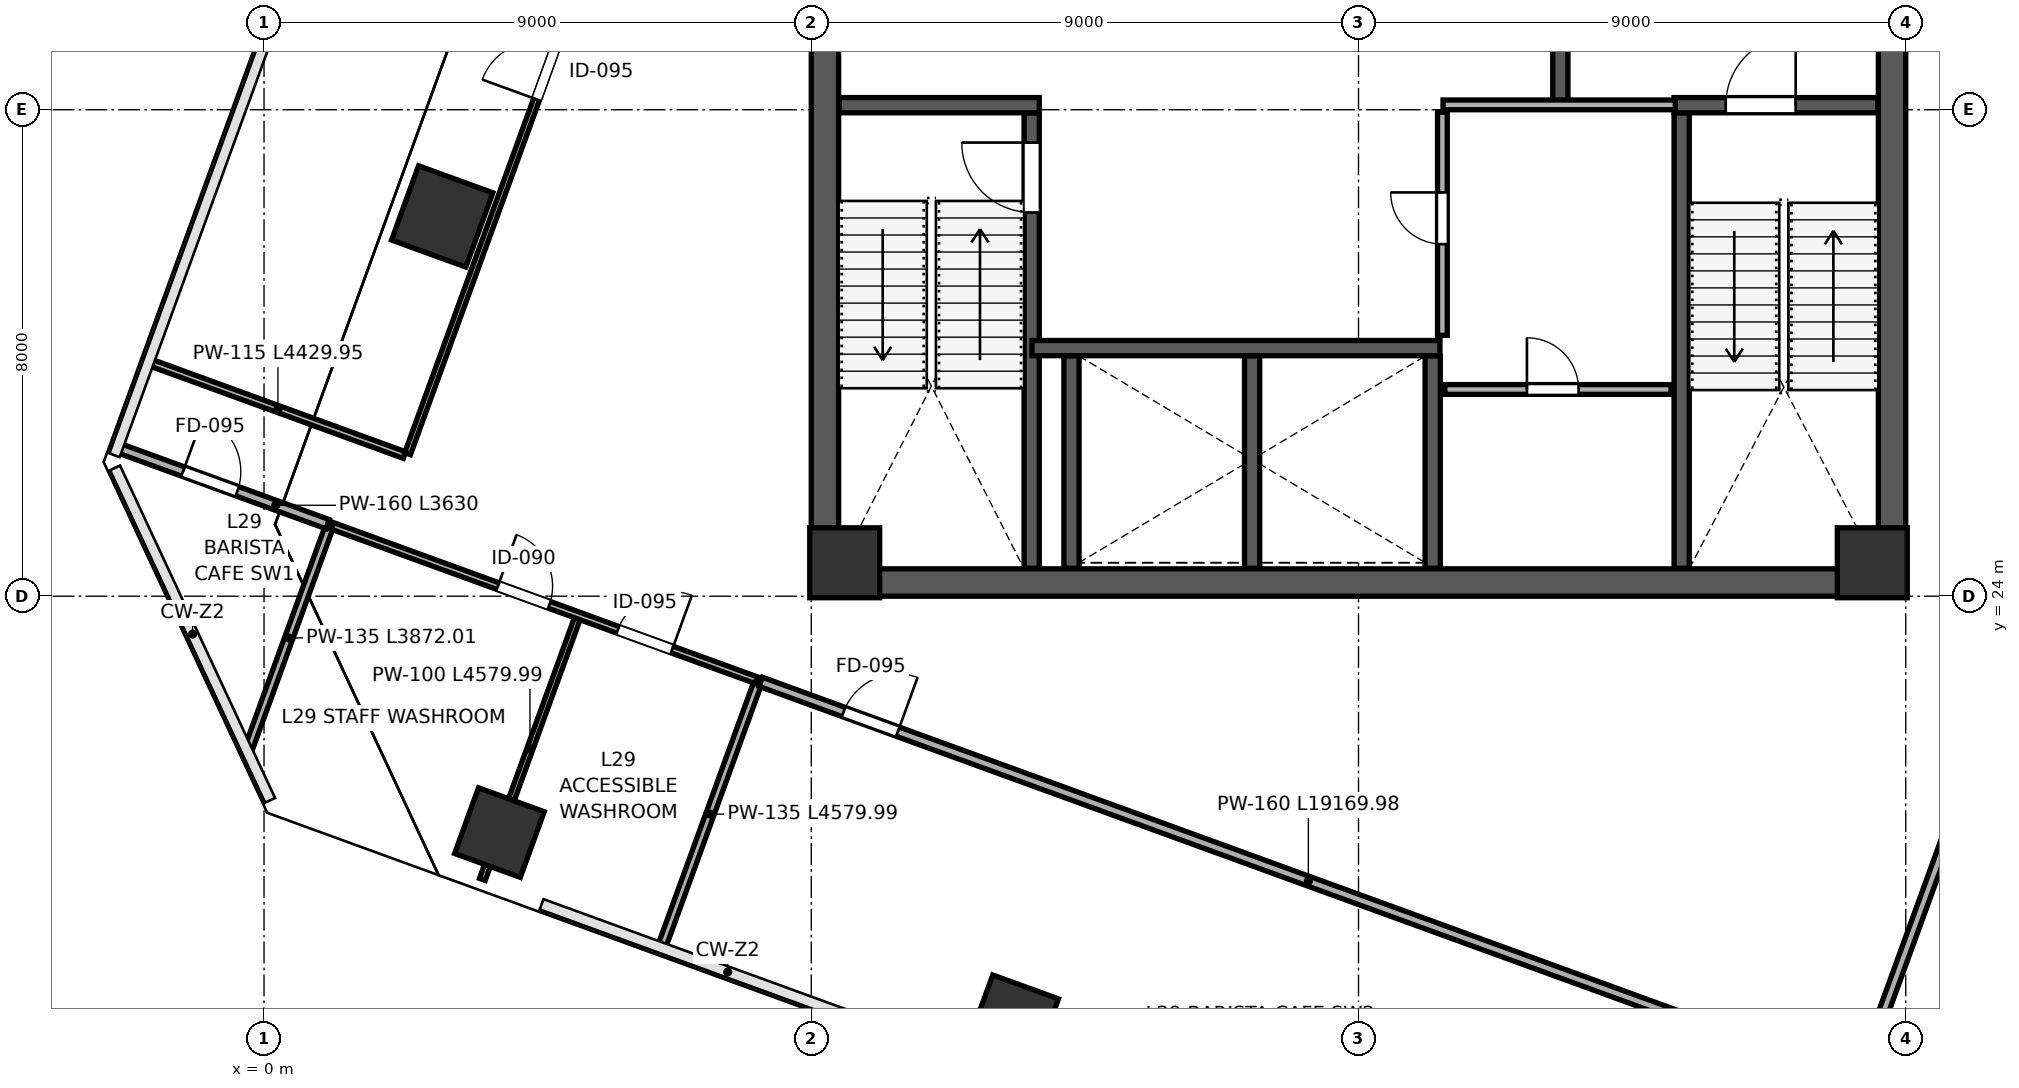
"""IFC4 building model, lengths in metres.
Left out: names, types, materials, properties, quantities, classifications, styles, units other than length and angle.
Written with IfcOpenShell. Run it as: python <this file> out.ifc"""

import sys

from ifc_helpers import new_model, si_unit, direction, frame, frame_2d, origin, origin_2d, place, context, subcontext, project, spatial, rectangle, extrude, clip, halfspace, source, transform, mapped, element, fill, save


model = new_model("IFC4")
c1 = context("Model", 3, precision=1e-05, world=origin(), true_north=direction((0.0, 1.0)))
c2 = subcontext(c1, "Body", "Model", "MODEL_VIEW")
j1 = project(units=[si_unit("LENGTHUNIT", "METRE"), si_unit("PLANEANGLEUNIT", "RADIAN")], contexts=[c1])
p1 = place(None, origin())
s1 = spatial("IfcSite", under=j1, at=p1, CompositionType="ELEMENT")
p2 = place(p1, origin())
s2 = spatial("IfcBuilding", under=s1, at=p2, CompositionType="ELEMENT")
p3 = place(p2, frame((0.0, 0.0, 133.0)))
s3 = spatial("IfcBuildingStorey", under=s2, at=p3, CompositionType="ELEMENT", Elevation=133.0)
m1 = source(origin(), c2, "Body", "SweptSolid", [
    extrude(rectangle(XDim=1.15, YDim=1.15, at=origin_2d()), origin(), (0.0, 0.0, 1.0), 4.198),
])
for number, where, z_axis, x_axis in (
    (1, (9.55, 24.55, 0.001), (0.0, 0.0, 1.0), (1.0, 0.0, 0.0)),
    (2, (26.45, 24.55, 0.001), (0.0, 0.0, 1.0), (1.0, 0.0, 0.0)),
):
    element("IfcColumn", number, at=place(p3, frame(where, z_axis=z_axis, x_axis=x_axis)), inside=s3, PredefinedType="COLUMN", context=c2, shape_type="MappedRepresentation", body=[
        mapped(m1, transform((0.0, 0.0, 0.0), scale=1.0)),
    ])
p4 = place(p3, frame((3.871, 20.113, 0.0), z_axis=(-0.060378020658, 0.091693702185, 0.99395510945), x_axis=(0.971784646973, 0.232861844496, 0.037549451193)))
e3 = element("IfcColumn", 3, at=p4, inside=s3, PredefinedType="COLUMN", context=c2, shape_type="Clipping", body=[
    clip(clip(extrude(rectangle(XDim=1.15, YDim=1.15, at=origin_2d()), origin(), (0.0, 0.0, 1.0), 4.226), halfspace(frame((0.0, 0.0, 0.082), z_axis=(0.0, 0.0, -1.0), x_axis=(1.0, 0.0, 0.0)), False)), halfspace(frame((0.0, 0.0, 4.144), z_axis=(0.0, 0.0, 1.0), x_axis=(1.0, 0.0, 0.0)), False)),
])
p5 = place(p3, frame((12.328, 17.034, 0.0), z_axis=(-0.076934640487, 0.048279526084, 0.995866531446), x_axis=(0.787992689397, 0.614900375793, 0.031065242737)))
e4 = element("IfcColumn", 4, at=p5, inside=s3, PredefinedType="COLUMN", context=c2, shape_type="Clipping", body=[
    clip(clip(extrude(rectangle(XDim=1.15, YDim=1.15, at=origin_2d()), origin(), (0.0, 0.0, 1.0), 4.217), halfspace(frame((0.0, 0.0, 0.068), z_axis=(0.0, 0.0, -1.0), x_axis=(1.0, 0.0, 0.0)), False)), halfspace(frame((0.0, 0.0, 4.149), z_axis=(0.0, 0.0, 1.0), x_axis=(1.0, 0.0, 0.0)), False)),
])
p6 = place(p3, frame((2.93, 30.246, 0.0), z_axis=(-0.007984514186, 0.096045605421, 0.995344909673), x_axis=(0.964665591545, -0.261407243839, 0.032962848131)))
e5 = element("IfcColumn", 5, at=p6, inside=s3, PredefinedType="COLUMN", context=c2, shape_type="Clipping", body=[
    clip(clip(extrude(rectangle(XDim=1.3, YDim=1.3, at=origin_2d()), origin(), (0.0, 0.0, 1.0), 4.219), halfspace(frame((0.0, 0.0, 0.082), z_axis=(0.0, 0.0, -1.0), x_axis=(1.0, 0.0, 0.0)), False)), halfspace(frame((0.0, 0.0, 4.138), z_axis=(0.0, 0.0, 1.0), x_axis=(1.0, 0.0, 0.0)), False)),
])
p7 = place(p3, frame((9.225, 24.45, 0.0), z_axis=(0.0, 0.0, 1.0), x_axis=(0.0, 1.0, 0.0)))
e6 = element("IfcWall", 6, at=p7, inside=s3, PredefinedType="SHEAR", context=c2, shape_type="SweptSolid", body=[
    extrude(rectangle(XDim=15.1, YDim=0.45, at=frame_2d((7.55, 0.0))), origin(), (0.0, 0.0, 1.0), 3.96),
])
p8 = place(p3, frame((26.775, 24.45, 0.0), z_axis=(0.0, 0.0, 1.0), x_axis=(0.0, 1.0, 0.0)))
e7 = element("IfcWall", 7, at=p8, inside=s3, PredefinedType="SHEAR", context=c2, shape_type="SweptSolid", body=[
    extrude(rectangle(XDim=15.1, YDim=0.45, at=frame_2d((7.55, 0.0))), origin(), (0.0, 0.0, 1.0), 3.96),
])
p9 = place(p8, frame((8.6, 0.0, 0.0)))
e8 = element("IfcOpeningElement", 8, at=p9, cuts=e7, PredefinedType="OPENING", context=c2, shape_type="SweptSolid", body=[
    extrude(rectangle(XDim=1.15, YDim=2.2, at=frame_2d((0.575, 1.1))), frame((0.0, 0.235, 0.0), z_axis=(0.0, -1.0, 0.0), x_axis=(1.0, 0.0, 0.0)), (0.0, 0.0, 1.0), 0.47),
])
p10 = place(p3, frame((9.0, 24.225, 0.0), z_axis=(0.0, 0.0, 1.0), x_axis=(1.0, 0.0, 0.0)))
e9 = element("IfcWall", 9, at=p10, inside=s3, PredefinedType="SHEAR", context=c2, shape_type="SweptSolid", body=[
    extrude(rectangle(XDim=18.0, YDim=0.45, at=frame_2d((9.0, 0.0))), origin(), (0.0, 0.0, 1.0), 3.96),
])
p11 = place(p3, frame((12.625, 24.46, 0.0), z_axis=(0.0, 0.0, 1.0), x_axis=(0.0, 1.0, 0.0)))
e10 = element("IfcWall", 10, at=p11, inside=s3, PredefinedType="SHEAR", context=c2, shape_type="SweptSolid", body=[
    extrude(rectangle(XDim=7.49, YDim=0.25, at=frame_2d((3.745, 0.0))), origin(), (0.0, 0.0, 1.0), 3.96),
])
p12 = place(p11, frame((5.85, 0.0, 0.0)))
e11 = element("IfcOpeningElement", 11, at=p12, cuts=e10, PredefinedType="OPENING", context=c2, shape_type="SweptSolid", body=[
    extrude(rectangle(XDim=1.15, YDim=2.2, at=frame_2d((0.575, 1.1))), frame((0.0, 0.135, 0.0), z_axis=(0.0, -1.0, 0.0), x_axis=(1.0, 0.0, 0.0)), (0.0, 0.0, 1.0), 0.27),
])
p13 = place(p3, frame((9.46, 32.075, 0.0), z_axis=(0.0, 0.0, 1.0), x_axis=(1.0, 0.0, 0.0)))
e12 = element("IfcWall", 12, at=p13, inside=s3, PredefinedType="SHEAR", context=c2, shape_type="SweptSolid", body=[
    extrude(rectangle(XDim=3.29, YDim=0.25, at=frame_2d((1.645, 0.0))), origin(), (0.0, 0.0, 1.0), 3.96),
])
p14 = place(p3, frame((23.315, 24.46, 0.0), z_axis=(0.0, 0.0, 1.0), x_axis=(0.0, 1.0, 0.0)))
e13 = element("IfcWall", 13, at=p14, inside=s3, PredefinedType="SHEAR", context=c2, shape_type="SweptSolid", body=[
    extrude(rectangle(XDim=7.49, YDim=0.25, at=frame_2d((3.745, 0.0))), origin(), (0.0, 0.0, 1.0), 3.96),
])
p15 = place(p3, frame((23.19, 32.075, 0.0), z_axis=(0.0, 0.0, 1.0), x_axis=(1.0, 0.0, 0.0)))
e14 = element("IfcWall", 14, at=p15, inside=s3, PredefinedType="SHEAR", context=c2, shape_type="SweptSolid", body=[
    extrude(rectangle(XDim=3.35, YDim=0.25, at=frame_2d((1.675, 0.0))), origin(), (0.0, 0.0, 1.0), 3.96),
])
p16 = place(p15, frame((0.85, 0.0, 0.0)))
e15 = element("IfcOpeningElement", 15, at=p16, cuts=e14, PredefinedType="OPENING", context=c2, shape_type="SweptSolid", body=[
    extrude(rectangle(XDim=1.15, YDim=2.2, at=frame_2d((0.575, 1.1))), frame((0.0, 0.135, 0.0), z_axis=(0.0, -1.0, 0.0), x_axis=(1.0, 0.0, 0.0)), (0.0, 0.0, 1.0), 0.27),
])
p17 = place(p3, frame((21.32, 32.12, 0.0), z_axis=(0.0, 0.0, 1.0), x_axis=(0.0, 1.0, 0.0)))
e16 = element("IfcWall", 16, at=p17, inside=s3, PredefinedType="SHEAR", context=c2, shape_type="SweptSolid", body=[
    extrude(rectangle(XDim=7.42, YDim=0.25, at=frame_2d((3.71, 0.0))), origin(), (0.0, 0.0, 1.0), 3.96),
])
p18 = place(p17, frame((1.4, 0.0, 0.0)))
e17 = element("IfcOpeningElement", 17, at=p18, cuts=e16, PredefinedType="OPENING", context=c2, shape_type="SweptSolid", body=[
    extrude(rectangle(XDim=1.15, YDim=2.2, at=frame_2d((0.575, 1.1))), frame((0.0, 0.135, 0.0), z_axis=(0.0, -1.0, 0.0), x_axis=(1.0, 0.0, 0.0)), (0.0, 0.0, 1.0), 0.27),
])
p19 = place(p3, frame((12.63, 28.08, 0.0), z_axis=(0.0, 0.0, 1.0), x_axis=(1.0, 0.0, 0.0)))
e18 = element("IfcWall", 18, at=p19, inside=s3, PredefinedType="SHEAR", context=c2, shape_type="SweptSolid", body=[
    extrude(rectangle(XDim=6.71, YDim=0.25, at=frame_2d((3.355, 0.0))), origin(), (0.0, 0.0, 1.0), 3.96),
])
for number, where, z_axis, x_axis in (
    (19, (13.28, 24.46, 0.0), (0.0, 0.0, 1.0), (0.0, 1.0, 0.0)),
    (20, (16.25, 24.46, 0.0), (0.0, 0.0, 1.0), (0.0, 1.0, 0.0)),
    (21, (19.22, 24.46, 0.0), (0.0, 0.0, 1.0), (0.0, 1.0, 0.0)),
):
    element("IfcWall", number, at=place(p3, frame(where, z_axis=z_axis, x_axis=x_axis)), inside=s3, PredefinedType="SHEAR", context=c2, shape_type="SweptSolid", body=[
        extrude(rectangle(XDim=3.49, YDim=0.25, at=frame_2d((1.745, 0.0))), origin(), (0.0, 0.0, 1.0), 3.96),
    ])
p20 = place(p3, frame((19.39, 32.08, 0.0), z_axis=(0.0, 0.0, 1.0), x_axis=(1.0, 0.0, 0.0)))
e22 = element("IfcWall", 22, at=p20, inside=s3, PredefinedType="PARTITIONING", context=c2, shape_type="SweptSolid", body=[
    extrude(rectangle(XDim=3.82, YDim=0.16, at=frame_2d((1.91, 0.0))), origin(), (0.0, 0.0, 1.0), 3.96),
])
p21 = place(p3, frame((19.38, 28.29, 0.0), z_axis=(0.0, 0.0, 1.0), x_axis=(0.0, 1.0, 0.0)))
e23 = element("IfcWall", 23, at=p21, inside=s3, PredefinedType="PARTITIONING", context=c2, shape_type="SweptSolid", body=[
    extrude(rectangle(XDim=3.67, YDim=0.16, at=frame_2d((1.835, 0.0))), origin(), (0.0, 0.0, 1.0), 3.96),
])
p22 = place(p21, frame((1.5, 0.0, 0.0)))
e24 = element("IfcOpeningElement", 24, at=p22, cuts=e23, PredefinedType="OPENING", context=c2, shape_type="SweptSolid", body=[
    extrude(rectangle(XDim=0.85, YDim=2.1, at=frame_2d((0.425, 1.05))), frame((0.0, 0.09, 0.0), z_axis=(0.0, -1.0, 0.0), x_axis=(1.0, 0.0, 0.0)), (0.0, 0.0, 1.0), 0.18),
])
p23 = place(p3, frame((19.42, 27.4, 0.0), z_axis=(0.0, 0.0, 1.0), x_axis=(1.0, 0.0, 0.0)))
e25 = element("IfcWall", 25, at=p23, inside=s3, PredefinedType="PARTITIONING", context=c2, shape_type="SweptSolid", body=[
    extrude(rectangle(XDim=3.72, YDim=0.16, at=frame_2d((1.86, 0.0))), origin(), (0.0, 0.0, 1.0), 3.96),
])
p24 = place(p23, frame((1.35, 0.0, 0.0)))
e26 = element("IfcOpeningElement", 26, at=p24, cuts=e25, PredefinedType="OPENING", context=c2, shape_type="SweptSolid", body=[
    extrude(rectangle(XDim=0.85, YDim=2.1, at=frame_2d((0.425, 1.05))), frame((0.0, 0.09, 0.0), z_axis=(0.0, -1.0, 0.0), x_axis=(1.0, 0.0, 0.0)), (0.0, 0.0, 1.0), 0.18),
])
p25 = place(p3, frame((-0.255, 21.495, 0.0), z_axis=(0.0, 0.0, 1.0), x_axis=(0.342006312725, 0.939697654598, 0.0)))
e27 = element("IfcWall", 27, at=p25, inside=s3, PredefinedType="PARTITIONING", context=c2, shape_type="SweptSolid", body=[
    extrude(rectangle(XDim=3.872, YDim=0.135, at=frame_2d((1.936, 0.0))), origin(), (0.0, 0.0, 1.0), 3.96),
])
p26 = place(p3, frame((-2.365, 26.427, 0.0), z_axis=(0.0, 0.0, 1.0), x_axis=(0.939671610829, -0.342077862192, 0.0)))
e28 = element("IfcWall", 28, at=p26, inside=s3, PredefinedType="PARTITIONING", context=c2, shape_type="SweptSolid", body=[
    extrude(rectangle(XDim=3.63, YDim=0.16, at=frame_2d((1.815, 0.0))), origin(), (0.0, 0.0, 1.0), 3.96),
])
p27 = place(p26, frame((1.1, 0.0, 0.0)))
e29 = element("IfcOpeningElement", 29, at=p27, cuts=e28, PredefinedType="OPENING", context=c2, shape_type="SweptSolid", body=[
    extrude(rectangle(XDim=0.95, YDim=2.15, at=frame_2d((0.475, 1.075))), frame((0.0, 0.09, 0.0), z_axis=(0.0, -1.0, 0.0), x_axis=(1.0, 0.0, 0.0)), (0.0, 0.0, 1.0), 0.18),
])
p28 = place(p3, frame((3.591, 19.342, 0.0), z_axis=(0.0, 0.0, 1.0), x_axis=(0.341969903355, 0.939710905119, 0.0)))
e30 = element("IfcWall", 30, at=p28, inside=s3, PredefinedType="PARTITIONING", context=c2, shape_type="SweptSolid", body=[
    extrude(rectangle(XDim=4.58, YDim=0.1, at=frame_2d((2.29, 0.0))), origin(), (0.0, 0.0, 1.0), 3.195),
])
p29 = place(p3, frame((6.551, 18.265, 0.0), z_axis=(0.0, 0.0, 1.0), x_axis=(0.342016975922, 0.939693773621, 0.0)))
e31 = element("IfcWall", 31, at=p29, inside=s3, PredefinedType="PARTITIONING", context=c2, shape_type="SweptSolid", body=[
    extrude(rectangle(XDim=4.58, YDim=0.135, at=frame_2d((2.29, 0.0))), origin(), (0.0, 0.0, 1.0), 3.195),
])
p30 = place(p3, frame((1.121, 25.157, 0.0), z_axis=(0.0, 0.0, 1.0), x_axis=(0.939692513883, -0.342020437038, 0.0)))
e32 = element("IfcWall", 32, at=p30, inside=s3, PredefinedType="PARTITIONING", context=c2, shape_type="SweptSolid", body=[
    extrude(rectangle(XDim=7.42, YDim=0.115, at=frame_2d((3.71, 0.0))), origin(), (0.0, 0.0, 1.0), 3.96),
])
p31 = place(p30, frame((2.9, 0.0, 0.0)))
e33 = element("IfcOpeningElement", 33, at=p31, cuts=e32, PredefinedType="OPENING", context=c2, shape_type="SweptSolid", body=[
    extrude(rectangle(XDim=0.9, YDim=2.15, at=frame_2d((0.45, 1.075))), frame((0.0, 0.067, 0.0), z_axis=(0.0, -1.0, 0.0), x_axis=(1.0, 0.0, 0.0)), (0.0, 0.0, 1.0), 0.135),
])
p32 = place(p30, frame((5.0, 0.0, 0.0)))
e34 = element("IfcOpeningElement", 34, at=p32, cuts=e32, PredefinedType="OPENING", context=c2, shape_type="SweptSolid", body=[
    extrude(rectangle(XDim=0.95, YDim=2.15, at=frame_2d((0.475, 1.075))), frame((0.0, 0.067, 0.0), z_axis=(0.0, -1.0, 0.0), x_axis=(1.0, 0.0, 0.0)), (0.0, 0.0, 1.0), 0.135),
])
p33 = place(p3, frame((8.168, 22.592, 0.0), z_axis=(0.0, 0.0, 1.0), x_axis=(0.939694846349, -0.342014028579, 0.0)))
e35 = element("IfcWall", 35, at=p33, inside=s3, PredefinedType="PARTITIONING", context=c2, shape_type="SweptSolid", body=[
    extrude(rectangle(XDim=19.17, YDim=0.16, at=frame_2d((9.585, 0.0))), origin(), (0.0, 0.0, 1.0), 3.96),
])
p34 = place(p33, frame((1.45, 0.0, 0.0)))
e36 = element("IfcOpeningElement", 36, at=p34, cuts=e35, PredefinedType="OPENING", context=c2, shape_type="SweptSolid", body=[
    extrude(rectangle(XDim=0.95, YDim=2.15, at=frame_2d((0.475, 1.075))), frame((0.0, 0.09, 0.0), z_axis=(0.0, -1.0, 0.0), x_axis=(1.0, 0.0, 0.0)), (0.0, 0.0, 1.0), 0.18),
])
p35 = place(p3, frame((-1.853, 27.836, 0.0), z_axis=(0.0, 0.0, 1.0), x_axis=(0.939693620895, -0.342017395535, 0.0)))
e37 = element("IfcWall", 37, at=p35, inside=s3, PredefinedType="PARTITIONING", context=c2, shape_type="SweptSolid", body=[
    extrude(rectangle(XDim=4.43, YDim=0.115, at=frame_2d((2.215, 0.0))), origin(), (0.0, 0.0, 1.0), 3.96),
])
p36 = place(p3, frame((2.362, 26.345, 0.0), z_axis=(0.0, 0.0, 1.0), x_axis=(0.342021727767, 0.939692044095, 0.0)))
e38 = element("IfcWall", 38, at=p36, inside=s3, PredefinedType="PARTITIONING", context=c2, shape_type="SweptSolid", body=[
    extrude(rectangle(XDim=22.72, YDim=0.1, at=frame_2d((11.36, 0.0))), origin(), (0.0, 0.0, 1.0), 3.96),
])
p37 = place(p36, frame((6.2, 0.0, 0.0)))
e39 = element("IfcOpeningElement", 39, at=p37, cuts=e38, PredefinedType="OPENING", context=c2, shape_type="SweptSolid", body=[
    extrude(rectangle(XDim=0.95, YDim=2.15, at=frame_2d((0.475, 1.075))), frame((0.0, 0.06, 0.0), z_axis=(0.0, -1.0, 0.0), x_axis=(1.0, 0.0, 0.0)), (0.0, 0.0, 1.0), 0.12),
])
p38 = place(p3, frame((24.64, 11.681, 0.0), z_axis=(0.0, 0.0, 1.0), x_axis=(0.342014151498, 0.939694801611, 0.0)))
e40 = element("IfcWall", 40, at=p38, inside=s3, PredefinedType="PARTITIONING", context=c2, shape_type="SweptSolid", body=[
    extrude(rectangle(XDim=20.68, YDim=0.16, at=frame_2d((10.34, 0.0))), origin(), (0.0, 0.0, 1.0), 3.96),
])
m2 = source(origin(), c2, "Body", "SweptSolid", [
    extrude(rectangle(XDim=1.15, YDim=2.2, at=frame_2d((0.575, 1.1))), frame((0.0, 0.025, 0.0), z_axis=(0.0, -1.0, 0.0), x_axis=(1.0, 0.0, 0.0)), (0.0, 0.0, 1.0), 0.05),
])
p39 = place(p12, origin())
e41 = element("IfcDoor", 41, at=p39, inside=s3, OperationType="SINGLE_SWING_RIGHT", PredefinedType="DOOR", context=c2, shape_type="MappedRepresentation", body=[
    mapped(m2, transform((0.0, 0.0, 0.0), scale=1.0)),
])
fill(e11, e41)
p40 = place(p16, origin())
e42 = element("IfcDoor", 42, at=p40, inside=s3, OperationType="SINGLE_SWING_RIGHT", PredefinedType="DOOR", context=c2, shape_type="MappedRepresentation", body=[
    mapped(m2, transform((0.0, 0.0, 0.0), scale=1.0)),
])
fill(e15, e42)
m3 = source(origin(), c2, "Body", "SweptSolid", [
    extrude(rectangle(XDim=0.85, YDim=2.1, at=frame_2d((0.425, 1.05))), frame((0.0, 0.025, 0.0), z_axis=(0.0, -1.0, 0.0), x_axis=(1.0, 0.0, 0.0)), (0.0, 0.0, 1.0), 0.05),
])
p41 = place(p24, origin())
e43 = element("IfcDoor", 43, at=p41, inside=s3, OperationType="SINGLE_SWING_LEFT", PredefinedType="DOOR", context=c2, shape_type="MappedRepresentation", body=[
    mapped(m3, transform((0.0, 0.0, 0.0), scale=1.0)),
])
fill(e26, e43)
p42 = place(p22, origin())
e44 = element("IfcDoor", 44, at=p42, inside=s3, OperationType="SINGLE_SWING_RIGHT", PredefinedType="DOOR", context=c2, shape_type="MappedRepresentation", body=[
    mapped(m3, transform((0.0, 0.0, 0.0), scale=1.0)),
])
fill(e24, e44)
m4 = source(origin(), c2, "Body", "SweptSolid", [
    extrude(rectangle(XDim=0.95, YDim=2.15, at=frame_2d((0.475, 1.075))), frame((0.0, 0.025, 0.0), z_axis=(0.0, -1.0, 0.0), x_axis=(1.0, 0.0, 0.0)), (0.0, 0.0, 1.0), 0.05),
])
p43 = place(p27, origin())
e45 = element("IfcDoor", 45, at=p43, inside=s3, OperationType="SINGLE_SWING_LEFT", PredefinedType="DOOR", context=c2, shape_type="MappedRepresentation", body=[
    mapped(m4, transform((0.0, 0.0, 0.0), scale=1.0)),
])
fill(e29, e45)
m5 = source(origin(), c2, "Body", "SweptSolid", [
    extrude(rectangle(XDim=0.9, YDim=2.15, at=frame_2d((0.45, 1.075))), frame((0.0, 0.025, 0.0), z_axis=(0.0, -1.0, 0.0), x_axis=(1.0, 0.0, 0.0)), (0.0, 0.0, 1.0), 0.05),
])
p44 = place(p31, origin())
e46 = element("IfcDoor", 46, at=p44, inside=s3, OperationType="SINGLE_SWING_LEFT", PredefinedType="DOOR", context=c2, shape_type="MappedRepresentation", body=[
    mapped(m5, transform((0.0, 0.0, 0.0), scale=1.0)),
])
fill(e33, e46)
m6 = source(origin(), c2, "Body", "SweptSolid", [
    extrude(rectangle(XDim=0.95, YDim=2.15, at=frame_2d((0.475, 1.075))), frame((0.0, 0.025, 0.0), z_axis=(0.0, -1.0, 0.0), x_axis=(1.0, 0.0, 0.0)), (0.0, 0.0, 1.0), 0.05),
])
p45 = place(p32, origin())
e47 = element("IfcDoor", 47, at=p45, inside=s3, OperationType="SINGLE_SWING_RIGHT", PredefinedType="DOOR", context=c2, shape_type="MappedRepresentation", body=[
    mapped(m6, transform((0.0, 0.0, 0.0), scale=1.0)),
])
fill(e34, e47)
p46 = place(p34, origin())
e48 = element("IfcDoor", 48, at=p46, inside=s3, OperationType="SINGLE_SWING_RIGHT", PredefinedType="DOOR", context=c2, shape_type="MappedRepresentation", body=[
    mapped(m4, transform((0.0, 0.0, 0.0), scale=1.0)),
])
fill(e36, e48)
p47 = place(p37, origin())
e49 = element("IfcDoor", 49, at=p47, inside=s3, OperationType="SINGLE_SWING_LEFT", PredefinedType="DOOR", context=c2, shape_type="MappedRepresentation", body=[
    mapped(m6, transform((0.0, 0.0, 0.0), scale=1.0)),
])
fill(e39, e49)
save(model, sys.argv[1])
